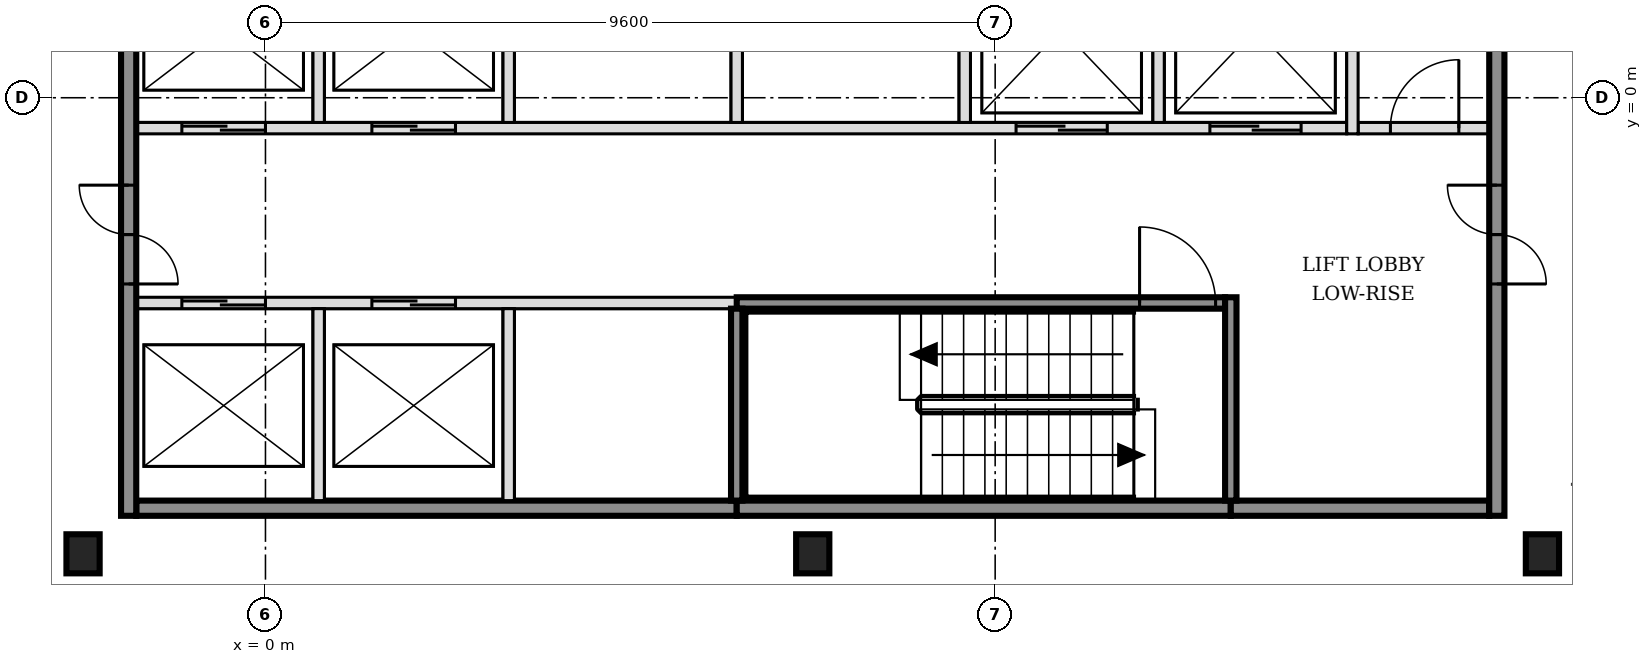
"""IFC4 building model, lengths in metres.
Left out: names, types, materials, properties, quantities, classifications, styles, units other than length and angle.
Written with IfcOpenShell. Run it as: python <this file> out.ifc"""

import sys

from ifc_helpers import new_model, si_unit, direction, frame, frame_2d, origin, origin_2d, place, context, subcontext, project, spatial, rectangle, i_section, extrude, element, fill, save


model = new_model("IFC4")
c1 = context("Model", 3, precision=1e-05, world=origin(), true_north=direction((0.0, 1.0)))
c2 = subcontext(c1, "Body", "Model", "MODEL_VIEW")
j1 = project(units=[si_unit("LENGTHUNIT", "METRE"), si_unit("PLANEANGLEUNIT", "RADIAN")], contexts=[c1])
p1 = place(None, origin())
s1 = spatial("IfcSite", under=j1, at=p1, CompositionType="ELEMENT")
p2 = place(p1, origin())
s2 = spatial("IfcBuilding", under=s1, at=p2, CompositionType="ELEMENT")
p3 = place(p2, frame((0.0, 0.0, 87.0)))
s3 = spatial("IfcBuildingStorey", under=s2, at=p3, CompositionType="ELEMENT", Elevation=87.0)
for number, where, z_axis, x_axis in (
    (1, (-2.4, -6.0, -0.15), (0.0, 0.0, 1.0), (1.0, 0.0, 0.0)),
    (2, (7.2, -6.0, -0.15), (0.0, 0.0, 1.0), (1.0, 0.0, 0.0)),
    (3, (16.8, -6.0, -0.15), (0.0, 0.0, 1.0), (1.0, 0.0, 0.0)),
):
    element("IfcColumn", number, at=place(p3, frame(where, z_axis=z_axis, x_axis=x_axis)), inside=s3, PredefinedType="COLUMN", context=c2, shape_type="SweptSolid", body=[
        extrude(i_section(OverallWidth=0.437, OverallDepth=0.514, WebThickness=0.061, FlangeThickness=0.097, FilletRadius=0.015, at=origin_2d()), origin(), (0.0, 0.0, 1.0), 3.6),
    ])
p4 = place(p3, frame((-1.7, -5.4, 0.0), z_axis=(0.0, 0.0, 1.0), x_axis=(1.0, 0.0, 0.0)))
e4 = element("IfcWall", 4, at=p4, inside=s3, PredefinedType="SOLIDWALL", context=c2, shape_type="SweptSolid", body=[
    extrude(rectangle(XDim=7.9, YDim=0.2, at=frame_2d((3.95, 0.0))), origin(), (0.0, 0.0, 1.0), 3.45),
])
p5 = place(p3, frame((6.2, -5.4, 0.0), z_axis=(0.0, 0.0, 1.0), x_axis=(1.0, 0.0, 0.0)))
e5 = element("IfcWall", 5, at=p5, inside=s3, PredefinedType="SOLIDWALL", context=c2, shape_type="SweptSolid", body=[
    extrude(rectangle(XDim=6.5, YDim=0.2, at=frame_2d((3.25, 0.0))), origin(), (0.0, 0.0, 1.0), 3.45),
])
p6 = place(p3, frame((12.7, -5.4, 0.0), z_axis=(0.0, 0.0, 1.0), x_axis=(1.0, 0.0, 0.0)))
e6 = element("IfcWall", 6, at=p6, inside=s3, PredefinedType="SOLIDWALL", context=c2, shape_type="SweptSolid", body=[
    extrude(rectangle(XDim=3.4, YDim=0.2, at=frame_2d((1.7, 0.0))), origin(), (0.0, 0.0, 1.0), 3.45),
])
p7 = place(p3, frame((-1.7, -2.7, 0.0), z_axis=(0.0, 0.0, 1.0), x_axis=(1.0, 0.0, 0.0)))
e7 = element("IfcWall", 7, at=p7, inside=s3, PredefinedType="SOLIDWALL", context=c2, shape_type="SweptSolid", body=[
    extrude(rectangle(XDim=7.9, YDim=0.15, at=frame_2d((3.95, 0.0))), origin(), (0.0, 0.0, 1.0), 3.45),
])
p8 = place(p7, frame((0.6, 0.0, 0.0)))
e8 = element("IfcOpeningElement", 8, at=p8, cuts=e7, PredefinedType="OPENING", context=c2, shape_type="SweptSolid", body=[
    extrude(rectangle(XDim=1.1, YDim=2.1, at=frame_2d((0.55, 1.05))), frame((0.0, 0.085, 0.0), z_axis=(0.0, -1.0, 0.0), x_axis=(1.0, 0.0, 0.0)), (0.0, 0.0, 1.0), 0.17),
])
p9 = place(p7, frame((3.1, 0.0, 0.0)))
e9 = element("IfcOpeningElement", 9, at=p9, cuts=e7, PredefinedType="OPENING", context=c2, shape_type="SweptSolid", body=[
    extrude(rectangle(XDim=1.1, YDim=2.1, at=frame_2d((0.55, 1.05))), frame((0.0, 0.085, 0.0), z_axis=(0.0, -1.0, 0.0), x_axis=(1.0, 0.0, 0.0)), (0.0, 0.0, 1.0), 0.17),
])
p10 = place(p3, frame((6.2, -2.7, 0.0), z_axis=(0.0, 0.0, 1.0), x_axis=(1.0, 0.0, 0.0)))
e10 = element("IfcWall", 10, at=p10, inside=s3, PredefinedType="SOLIDWALL", context=c2, shape_type="SweptSolid", body=[
    extrude(rectangle(XDim=6.425, YDim=0.15, at=frame_2d((3.212, 0.0))), origin(), (0.0, 0.0, 1.0), 3.45),
])
p11 = place(p10, frame((5.3, 0.0, 0.0)))
e11 = element("IfcOpeningElement", 11, at=p11, cuts=e10, PredefinedType="OPENING", context=c2, shape_type="SweptSolid", body=[
    extrude(rectangle(XDim=1.0, YDim=2.1, at=frame_2d((0.5, 1.05))), frame((0.0, 0.085, 0.0), z_axis=(0.0, -1.0, 0.0), x_axis=(1.0, 0.0, 0.0)), (0.0, 0.0, 1.0), 0.17),
])
p12 = place(p3, frame((-1.7, -0.4, 0.0), z_axis=(0.0, 0.0, 1.0), x_axis=(1.0, 0.0, 0.0)))
e12 = element("IfcWall", 12, at=p12, inside=s3, PredefinedType="SOLIDWALL", context=c2, shape_type="SweptSolid", body=[
    extrude(rectangle(XDim=15.925, YDim=0.15, at=frame_2d((7.962, 0.0))), origin(), (0.0, 0.0, 1.0), 3.45),
])
p13 = place(p12, frame((0.6, 0.0, 0.0)))
e13 = element("IfcOpeningElement", 13, at=p13, cuts=e12, PredefinedType="OPENING", context=c2, shape_type="SweptSolid", body=[
    extrude(rectangle(XDim=1.1, YDim=2.1, at=frame_2d((0.55, 1.05))), frame((0.0, 0.085, 0.0), z_axis=(0.0, -1.0, 0.0), x_axis=(1.0, 0.0, 0.0)), (0.0, 0.0, 1.0), 0.17),
])
p14 = place(p12, frame((3.1, 0.0, 0.0)))
e14 = element("IfcOpeningElement", 14, at=p14, cuts=e12, PredefinedType="OPENING", context=c2, shape_type="SweptSolid", body=[
    extrude(rectangle(XDim=1.1, YDim=2.1, at=frame_2d((0.55, 1.05))), frame((0.0, 0.085, 0.0), z_axis=(0.0, -1.0, 0.0), x_axis=(1.0, 0.0, 0.0)), (0.0, 0.0, 1.0), 0.17),
])
p15 = place(p12, frame((11.575, 0.0, 0.0)))
e15 = element("IfcOpeningElement", 15, at=p15, cuts=e12, PredefinedType="OPENING", context=c2, shape_type="SweptSolid", body=[
    extrude(rectangle(XDim=1.2, YDim=2.1, at=frame_2d((0.6, 1.05))), frame((0.0, 0.085, 0.0), z_axis=(0.0, -1.0, 0.0), x_axis=(1.0, 0.0, 0.0)), (0.0, 0.0, 1.0), 0.17),
])
p16 = place(p12, frame((14.125, 0.0, 0.0)))
e16 = element("IfcOpeningElement", 16, at=p16, cuts=e12, PredefinedType="OPENING", context=c2, shape_type="SweptSolid", body=[
    extrude(rectangle(XDim=1.2, YDim=2.1, at=frame_2d((0.6, 1.05))), frame((0.0, 0.085, 0.0), z_axis=(0.0, -1.0, 0.0), x_axis=(1.0, 0.0, 0.0)), (0.0, 0.0, 1.0), 0.17),
])
p17 = place(p3, frame((14.375, -0.4, 0.0), z_axis=(0.0, 0.0, 1.0), x_axis=(1.0, 0.0, 0.0)))
e17 = element("IfcWall", 17, at=p17, inside=s3, PredefinedType="PARTITIONING", context=c2, shape_type="SweptSolid", body=[
    extrude(rectangle(XDim=1.725, YDim=0.15, at=frame_2d((0.863, 0.0))), origin(), (0.0, 0.0, 1.0), 3.45),
])
p18 = place(p17, frame((0.425, 0.0, 0.0)))
e18 = element("IfcOpeningElement", 18, at=p18, cuts=e17, PredefinedType="OPENING", context=c2, shape_type="SweptSolid", body=[
    extrude(rectangle(XDim=0.9, YDim=2.1, at=frame_2d((0.45, 1.05))), frame((0.0, 0.085, 0.0), z_axis=(0.0, -1.0, 0.0), x_axis=(1.0, 0.0, 0.0)), (0.0, 0.0, 1.0), 0.17),
])
p19 = place(p3, frame((-1.8, -5.5, 0.0), z_axis=(0.0, 0.0, 1.0), x_axis=(0.0, 1.0, 0.0)))
e19 = element("IfcWall", 19, at=p19, inside=s3, PredefinedType="SOLIDWALL", context=c2, shape_type="SweptSolid", body=[
    extrude(rectangle(XDim=15.8, YDim=0.2, at=frame_2d((7.9, 0.0))), origin(), (0.0, 0.0, 1.0), 3.45),
])
p20 = place(p19, frame((3.05, 0.0, 0.0)))
e20 = element("IfcOpeningElement", 20, at=p20, cuts=e19, PredefinedType="OPENING", context=c2, shape_type="SweptSolid", body=[
    extrude(rectangle(XDim=1.3, YDim=2.1, at=frame_2d((0.65, 1.05))), frame((0.0, 0.11, 0.0), z_axis=(0.0, -1.0, 0.0), x_axis=(1.0, 0.0, 0.0)), (0.0, 0.0, 1.0), 0.22),
])
p21 = place(p19, frame((11.45, 0.0, 0.0)))
e21 = element("IfcOpeningElement", 21, at=p21, cuts=e19, PredefinedType="OPENING", context=c2, shape_type="SweptSolid", body=[
    extrude(rectangle(XDim=1.3, YDim=2.1, at=frame_2d((0.65, 1.05))), frame((0.0, 0.11, 0.0), z_axis=(0.0, -1.0, 0.0), x_axis=(1.0, 0.0, 0.0)), (0.0, 0.0, 1.0), 0.22),
])
p22 = place(p3, frame((0.7, -5.3, 0.0), z_axis=(0.0, 0.0, 1.0), x_axis=(0.0, 1.0, 0.0)))
e22 = element("IfcWall", 22, at=p22, inside=s3, PredefinedType="SOLIDWALL", context=c2, shape_type="SweptSolid", body=[
    extrude(rectangle(XDim=2.525, YDim=0.15, at=frame_2d((1.263, 0.0))), origin(), (0.0, 0.0, 1.0), 3.45),
])
p23 = place(p3, frame((0.7, -0.325, 0.0), z_axis=(0.0, 0.0, 1.0), x_axis=(0.0, 1.0, 0.0)))
e23 = element("IfcWall", 23, at=p23, inside=s3, PredefinedType="SOLIDWALL", context=c2, shape_type="SweptSolid", body=[
    extrude(rectangle(XDim=2.45, YDim=0.15, at=frame_2d((1.225, 0.0))), origin(), (0.0, 0.0, 1.0), 3.45),
])
p24 = place(p3, frame((3.2, -5.3, 0.0), z_axis=(0.0, 0.0, 1.0), x_axis=(0.0, 1.0, 0.0)))
e24 = element("IfcWall", 24, at=p24, inside=s3, PredefinedType="SOLIDWALL", context=c2, shape_type="SweptSolid", body=[
    extrude(rectangle(XDim=2.525, YDim=0.15, at=frame_2d((1.263, 0.0))), origin(), (0.0, 0.0, 1.0), 3.45),
])
p25 = place(p3, frame((3.2, -0.325, 0.0), z_axis=(0.0, 0.0, 1.0), x_axis=(0.0, 1.0, 0.0)))
e25 = element("IfcWall", 25, at=p25, inside=s3, PredefinedType="SOLIDWALL", context=c2, shape_type="SweptSolid", body=[
    extrude(rectangle(XDim=2.45, YDim=0.15, at=frame_2d((1.225, 0.0))), origin(), (0.0, 0.0, 1.0), 3.45),
])
p26 = place(p3, frame((6.2, -5.3, 0.0), z_axis=(0.0, 0.0, 1.0), x_axis=(0.0, 1.0, 0.0)))
e26 = element("IfcWall", 26, at=p26, inside=s3, PredefinedType="SOLIDWALL", context=c2, shape_type="SweptSolid", body=[
    extrude(rectangle(XDim=2.525, YDim=0.15, at=frame_2d((1.263, 0.0))), origin(), (0.0, 0.0, 1.0), 3.45),
])
for number, where, z_axis, x_axis in (
    (27, (6.2, -0.325, 0.0), (0.0, 0.0, 1.0), (0.0, 1.0, 0.0)),
    (28, (9.2, -0.325, 0.0), (0.0, 0.0, 1.0), (0.0, 1.0, 0.0)),
    (29, (11.75, -0.325, 0.0), (0.0, 0.0, 1.0), (0.0, 1.0, 0.0)),
):
    element("IfcWall", number, at=place(p3, frame(where, z_axis=z_axis, x_axis=x_axis)), inside=s3, PredefinedType="SOLIDWALL", context=c2, shape_type="SweptSolid", body=[
        extrude(rectangle(XDim=2.45, YDim=0.15, at=frame_2d((1.225, 0.0))), origin(), (0.0, 0.0, 1.0), 3.45),
    ])
p27 = place(p3, frame((12.7, -5.3, 0.0), z_axis=(0.0, 0.0, 1.0), x_axis=(0.0, 1.0, 0.0)))
e30 = element("IfcWall", 30, at=p27, inside=s3, PredefinedType="SOLIDWALL", context=c2, shape_type="SweptSolid", body=[
    extrude(rectangle(XDim=2.675, YDim=0.15, at=frame_2d((1.337, 0.0))), origin(), (0.0, 0.0, 1.0), 3.45),
])
p28 = place(p3, frame((14.3, -0.475, 0.0), z_axis=(0.0, 0.0, 1.0), x_axis=(0.0, 1.0, 0.0)))
e31 = element("IfcWall", 31, at=p28, inside=s3, PredefinedType="SOLIDWALL", context=c2, shape_type="SweptSolid", body=[
    extrude(rectangle(XDim=2.75, YDim=0.15, at=frame_2d((1.375, 0.0))), origin(), (0.0, 0.0, 1.0), 3.45),
])
p29 = place(p3, frame((16.2, -5.5, 0.0), z_axis=(0.0, 0.0, 1.0), x_axis=(0.0, 1.0, 0.0)))
e32 = element("IfcWall", 32, at=p29, inside=s3, PredefinedType="SOLIDWALL", context=c2, shape_type="SweptSolid", body=[
    extrude(rectangle(XDim=15.8, YDim=0.2, at=frame_2d((7.9, 0.0))), origin(), (0.0, 0.0, 1.0), 3.45),
])
p30 = place(p29, frame((3.05, 0.0, 0.0)))
e33 = element("IfcOpeningElement", 33, at=p30, cuts=e32, PredefinedType="OPENING", context=c2, shape_type="SweptSolid", body=[
    extrude(rectangle(XDim=1.3, YDim=2.1, at=frame_2d((0.65, 1.05))), frame((0.0, 0.11, 0.0), z_axis=(0.0, -1.0, 0.0), x_axis=(1.0, 0.0, 0.0)), (0.0, 0.0, 1.0), 0.22),
])
p31 = place(p29, frame((11.45, 0.0, 0.0)))
e34 = element("IfcOpeningElement", 34, at=p31, cuts=e32, PredefinedType="OPENING", context=c2, shape_type="SweptSolid", body=[
    extrude(rectangle(XDim=1.3, YDim=2.1, at=frame_2d((0.65, 1.05))), frame((0.0, 0.11, 0.0), z_axis=(0.0, -1.0, 0.0), x_axis=(1.0, 0.0, 0.0)), (0.0, 0.0, 1.0), 0.22),
])
p32 = place(p8, origin())
e35 = element("IfcDoor", 35, at=p32, inside=s3, OperationType="DOUBLE_DOOR_SLIDING", PredefinedType="DOOR", context=c2, shape_type="SweptSolid", body=[
    extrude(rectangle(XDim=1.1, YDim=2.1, at=frame_2d((0.55, 1.05))), frame((0.0, 0.025, 0.0), z_axis=(0.0, -1.0, 0.0), x_axis=(1.0, 0.0, 0.0)), (0.0, 0.0, 1.0), 0.05),
])
fill(e8, e35)
p33 = place(p9, origin())
e36 = element("IfcDoor", 36, at=p33, inside=s3, OperationType="DOUBLE_DOOR_SLIDING", PredefinedType="DOOR", context=c2, shape_type="SweptSolid", body=[
    extrude(rectangle(XDim=1.1, YDim=2.1, at=frame_2d((0.55, 1.05))), frame((0.0, 0.025, 0.0), z_axis=(0.0, -1.0, 0.0), x_axis=(1.0, 0.0, 0.0)), (0.0, 0.0, 1.0), 0.05),
])
fill(e9, e36)
p34 = place(p13, origin())
e37 = element("IfcDoor", 37, at=p34, inside=s3, OperationType="DOUBLE_DOOR_SLIDING", PredefinedType="DOOR", context=c2, shape_type="SweptSolid", body=[
    extrude(rectangle(XDim=1.1, YDim=2.1, at=frame_2d((0.55, 1.05))), frame((0.0, 0.025, 0.0), z_axis=(0.0, -1.0, 0.0), x_axis=(1.0, 0.0, 0.0)), (0.0, 0.0, 1.0), 0.05),
])
fill(e13, e37)
p35 = place(p14, origin())
e38 = element("IfcDoor", 38, at=p35, inside=s3, OperationType="DOUBLE_DOOR_SLIDING", PredefinedType="DOOR", context=c2, shape_type="SweptSolid", body=[
    extrude(rectangle(XDim=1.1, YDim=2.1, at=frame_2d((0.55, 1.05))), frame((0.0, 0.025, 0.0), z_axis=(0.0, -1.0, 0.0), x_axis=(1.0, 0.0, 0.0)), (0.0, 0.0, 1.0), 0.05),
])
fill(e14, e38)
p36 = place(p15, origin())
e39 = element("IfcDoor", 39, at=p36, inside=s3, OperationType="DOUBLE_DOOR_SLIDING", PredefinedType="DOOR", context=c2, shape_type="SweptSolid", body=[
    extrude(rectangle(XDim=1.2, YDim=2.1, at=frame_2d((0.6, 1.05))), frame((0.0, 0.025, 0.0), z_axis=(0.0, -1.0, 0.0), x_axis=(1.0, 0.0, 0.0)), (0.0, 0.0, 1.0), 0.05),
])
fill(e15, e39)
p37 = place(p16, origin())
e40 = element("IfcDoor", 40, at=p37, inside=s3, OperationType="DOUBLE_DOOR_SLIDING", PredefinedType="DOOR", context=c2, shape_type="SweptSolid", body=[
    extrude(rectangle(XDim=1.2, YDim=2.1, at=frame_2d((0.6, 1.05))), frame((0.0, 0.025, 0.0), z_axis=(0.0, -1.0, 0.0), x_axis=(1.0, 0.0, 0.0)), (0.0, 0.0, 1.0), 0.05),
])
fill(e16, e40)
p38 = place(p11, origin())
e41 = element("IfcDoor", 41, at=p38, inside=s3, OperationType="SINGLE_SWING_LEFT", PredefinedType="DOOR", context=c2, shape_type="SweptSolid", body=[
    extrude(rectangle(XDim=1.0, YDim=2.1, at=frame_2d((0.5, 1.05))), frame((0.0, 0.025, 0.0), z_axis=(0.0, -1.0, 0.0), x_axis=(1.0, 0.0, 0.0)), (0.0, 0.0, 1.0), 0.05),
])
fill(e11, e41)
p39 = place(p20, origin())
e42 = element("IfcDoor", 42, at=p39, inside=s3, OperationType="DOUBLE_DOOR_SINGLE_SWING", PredefinedType="DOOR", context=c2, shape_type="SweptSolid", body=[
    extrude(rectangle(XDim=1.3, YDim=2.1, at=frame_2d((0.65, 1.05))), frame((0.0, 0.025, 0.0), z_axis=(0.0, -1.0, 0.0), x_axis=(1.0, 0.0, 0.0)), (0.0, 0.0, 1.0), 0.05),
])
fill(e20, e42)
p40 = place(p30, origin())
e43 = element("IfcDoor", 43, at=p40, inside=s3, OperationType="DOUBLE_DOOR_SINGLE_SWING", PredefinedType="DOOR", context=c2, shape_type="SweptSolid", body=[
    extrude(rectangle(XDim=1.3, YDim=2.1, at=frame_2d((0.65, 1.05))), frame((0.0, 0.025, 0.0), z_axis=(0.0, -1.0, 0.0), x_axis=(1.0, 0.0, 0.0)), (0.0, 0.0, 1.0), 0.05),
])
fill(e33, e43)
p41 = place(p18, origin())
e44 = element("IfcDoor", 44, at=p41, inside=s3, OperationType="SINGLE_SWING_RIGHT", PredefinedType="DOOR", context=c2, shape_type="SweptSolid", body=[
    extrude(rectangle(XDim=0.9, YDim=2.1, at=frame_2d((0.45, 1.05))), frame((0.0, 0.025, 0.0), z_axis=(0.0, -1.0, 0.0), x_axis=(1.0, 0.0, 0.0)), (0.0, 0.0, 1.0), 0.05),
])
fill(e18, e44)
save(model, sys.argv[1])
